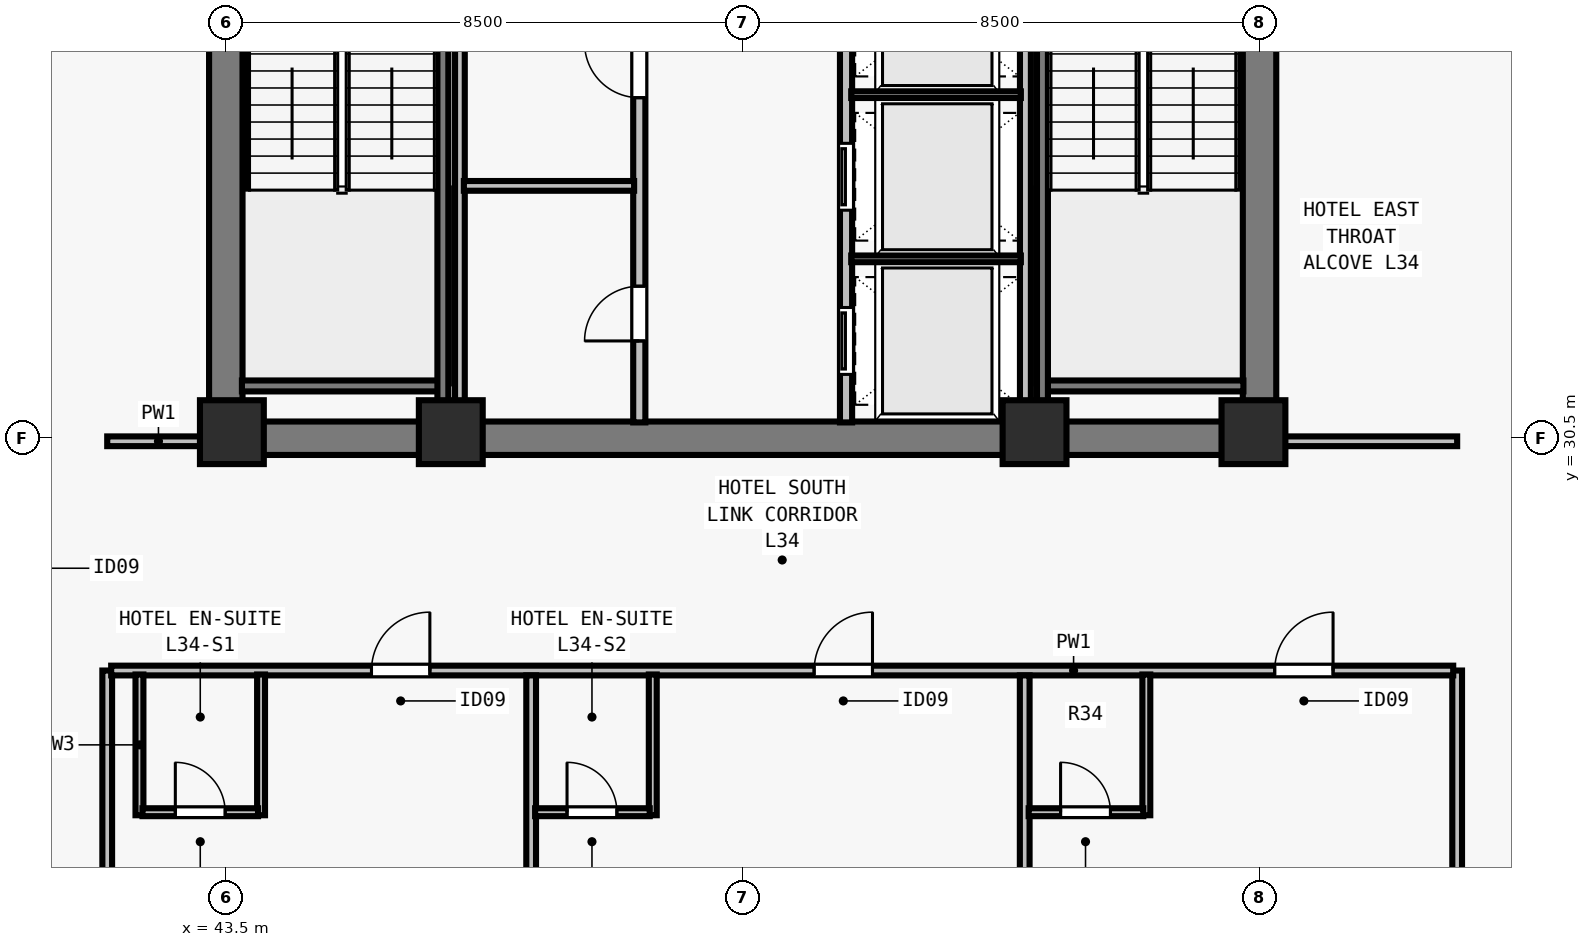
"""IFC4 building model, lengths in metres.
Left out: names, types, materials, properties, quantities, classifications, styles, units other than length and angle.
Written with IfcOpenShell. Run it as: python <this file> out.ifc"""

import sys

from ifc_helpers import new_model, si_unit, direction, frame, frame_2d, origin, origin_2d, place, context, subcontext, project, spatial, rectangle, extrude, element, fill, save


model = new_model("IFC4")
c1 = context("Model", 3, precision=1e-05, world=origin(), true_north=direction((0.0, 1.0)))
c2 = subcontext(c1, "Body", "Model", "MODEL_VIEW")
j1 = project(units=[si_unit("LENGTHUNIT", "METRE"), si_unit("PLANEANGLEUNIT", "RADIAN")], contexts=[c1])
p1 = place(None, origin())
s1 = spatial("IfcSite", under=j1, at=p1, CompositionType="ELEMENT")
p2 = place(p1, origin())
s2 = spatial("IfcBuilding", under=s1, at=p2, CompositionType="ELEMENT")
p3 = place(p2, frame((0.0, 0.0, 127.0)))
s3 = spatial("IfcBuildingStorey", under=s2, at=p3, CompositionType="ELEMENT", Elevation=127.0)
for number, where, z_axis, x_axis in (
    (1, (43.6, 30.6, 0.0), (0.0, 0.0, 1.0), (1.0, 0.0, 0.0)),
    (2, (47.2, 30.6, 0.0), (0.0, 0.0, 1.0), (1.0, 0.0, 0.0)),
    (3, (56.8, 30.6, 0.0), (0.0, 0.0, 1.0), (1.0, 0.0, 0.0)),
    (4, (60.4, 30.6, 0.0), (0.0, 0.0, 1.0), (1.0, 0.0, 0.0)),
):
    element("IfcColumn", number, at=place(p3, frame(where, z_axis=z_axis, x_axis=x_axis)), inside=s3, PredefinedType="COLUMN", context=c2, shape_type="SweptSolid", body=[
        extrude(rectangle(XDim=1.05, YDim=1.05, at=origin_2d()), origin(), (0.0, 0.0, 1.0), 3.5),
    ])
p4 = place(p3, frame((43.225, 30.5, 0.0), z_axis=(0.0, 0.0, 1.0), x_axis=(1.0, 0.0, 0.0)))
e5 = element("IfcWall", 5, at=p4, inside=s3, PredefinedType="SHEAR", context=c2, shape_type="SweptSolid", body=[
    extrude(rectangle(XDim=17.55, YDim=0.55, at=frame_2d((8.775, 0.0))), origin(), (0.0, 0.0, 1.0), 3.28),
])
for number, where, z_axis, x_axis in (
    (6, (43.5, 30.765, 0.0), (0.0, 0.0, 1.0), (0.0, 1.0, 0.0)),
    (7, (60.5, 30.765, 0.0), (0.0, 0.0, 1.0), (0.0, 1.0, 0.0)),
):
    element("IfcWall", number, at=place(p3, frame(where, z_axis=z_axis, x_axis=x_axis)), inside=s3, PredefinedType="SHEAR", context=c2, shape_type="SweptSolid", body=[
        extrude(rectangle(XDim=7.985, YDim=0.55, at=frame_2d((3.993, 0.0))), origin(), (0.0, 0.0, 1.0), 3.28),
    ])
p5 = place(p3, frame((50.3, 30.76, 0.0), z_axis=(0.0, 0.0, 1.0), x_axis=(0.0, 1.0, 0.0)))
e8 = element("IfcWall", 8, at=p5, inside=s3, PredefinedType="SOLIDWALL", context=c2, shape_type="SweptSolid", body=[
    extrude(rectangle(XDim=7.855, YDim=0.2, at=frame_2d((3.927, 0.0))), origin(), (0.0, 0.0, 1.0), 3.28),
])
p6 = place(p5, frame((1.34, 0.0, 0.0)))
e9 = element("IfcOpeningElement", 9, at=p6, cuts=e8, PredefinedType="OPENING", context=c2, shape_type="SweptSolid", body=[
    extrude(rectangle(XDim=0.9, YDim=2.12, at=frame_2d((0.45, 1.06))), frame((0.0, 0.11, 0.0), z_axis=(0.0, -1.0, 0.0), x_axis=(1.0, 0.0, 0.0)), (0.0, 0.0, 1.0), 0.22),
])
p7 = place(p5, frame((5.34, 0.0, 0.0)))
e10 = element("IfcOpeningElement", 10, at=p7, cuts=e8, PredefinedType="OPENING", context=c2, shape_type="SweptSolid", body=[
    extrude(rectangle(XDim=0.9, YDim=2.12, at=frame_2d((0.45, 1.06))), frame((0.0, 0.11, 0.0), z_axis=(0.0, -1.0, 0.0), x_axis=(1.0, 0.0, 0.0)), (0.0, 0.0, 1.0), 0.22),
])
p8 = place(p3, frame((53.7, 30.76, 0.0), z_axis=(0.0, 0.0, 1.0), x_axis=(0.0, 1.0, 0.0)))
e11 = element("IfcWall", 11, at=p8, inside=s3, PredefinedType="SOLIDWALL", context=c2, shape_type="SweptSolid", body=[
    extrude(rectangle(XDim=7.855, YDim=0.2, at=frame_2d((3.927, 0.0))), origin(), (0.0, 0.0, 1.0), 3.28),
])
p9 = place(p8, frame((0.79, 0.0, 0.0)))
e12 = element("IfcOpeningElement", 12, at=p9, cuts=e11, PredefinedType="OPENING", context=c2, shape_type="SweptSolid", body=[
    extrude(rectangle(XDim=1.1, YDim=2.2, at=frame_2d((0.55, 1.1))), frame((0.0, 0.11, 0.0), z_axis=(0.0, -1.0, 0.0), x_axis=(1.0, 0.0, 0.0)), (0.0, 0.0, 1.0), 0.22),
])
p10 = place(p8, frame((3.49, 0.0, 0.0)))
e13 = element("IfcOpeningElement", 13, at=p10, cuts=e11, PredefinedType="OPENING", context=c2, shape_type="SweptSolid", body=[
    extrude(rectangle(XDim=1.1, YDim=2.2, at=frame_2d((0.55, 1.1))), frame((0.0, 0.11, 0.0), z_axis=(0.0, -1.0, 0.0), x_axis=(1.0, 0.0, 0.0)), (0.0, 0.0, 1.0), 0.22),
])
p11 = place(p8, frame((6.19, 0.0, 0.0)))
e14 = element("IfcOpeningElement", 14, at=p11, cuts=e11, PredefinedType="OPENING", context=c2, shape_type="SweptSolid", body=[
    extrude(rectangle(XDim=1.1, YDim=2.2, at=frame_2d((0.55, 1.1))), frame((0.0, 0.11, 0.0), z_axis=(0.0, -1.0, 0.0), x_axis=(1.0, 0.0, 0.0)), (0.0, 0.0, 1.0), 0.22),
])
p12 = place(p3, frame((47.35, 30.76, 0.0), z_axis=(0.0, 0.0, 1.0), x_axis=(0.0, 1.0, 0.0)))
e15 = element("IfcWall", 15, at=p12, inside=s3, PredefinedType="PARTITIONING", context=c2, shape_type="SweptSolid", body=[
    extrude(rectangle(XDim=7.855, YDim=0.16, at=frame_2d((3.927, 0.0))), origin(), (0.0, 0.0, 1.0), 3.28),
])
p13 = place(p3, frame((47.415, 34.65, 0.0), z_axis=(0.0, 0.0, 1.0), x_axis=(1.0, 0.0, 0.0)))
e16 = element("IfcWall", 16, at=p13, inside=s3, PredefinedType="PARTITIONING", context=c2, shape_type="SweptSolid", body=[
    extrude(rectangle(XDim=2.8, YDim=0.16, at=frame_2d((1.4, 0.0))), origin(), (0.0, 0.0, 1.0), 3.28),
])
p14 = place(p3, frame((56.65, 30.76, 0.0), z_axis=(0.0, 0.0, 1.0), x_axis=(0.0, 1.0, 0.0)))
e17 = element("IfcWall", 17, at=p14, inside=s3, PredefinedType="SOLIDWALL", context=c2, shape_type="SweptSolid", body=[
    extrude(rectangle(XDim=7.855, YDim=0.18, at=frame_2d((3.927, 0.0))), origin(), (0.0, 0.0, 1.0), 3.28),
])
for number, where, z_axis, x_axis in (
    (18, (53.785, 33.45, 0.0), (0.0, 0.0, 1.0), (1.0, 0.0, 0.0)),
    (19, (53.785, 36.15, 0.0), (0.0, 0.0, 1.0), (1.0, 0.0, 0.0)),
):
    element("IfcWall", number, at=place(p3, frame(where, z_axis=z_axis, x_axis=x_axis)), inside=s3, PredefinedType="PARTITIONING", context=c2, shape_type="SweptSolid", body=[
        extrude(rectangle(XDim=2.79, YDim=0.11, at=frame_2d((1.395, 0.0))), origin(), (0.0, 0.0, 1.0), 3.28),
    ])
p15 = place(p3, frame((41.55, 15.325, 0.0), z_axis=(0.0, 0.0, 1.0), x_axis=(0.0, 1.0, 0.0)))
e20 = element("IfcWall", 20, at=p15, inside=s3, PredefinedType="PARTITIONING", context=c2, shape_type="SweptSolid", body=[
    extrude(rectangle(XDim=11.355, YDim=0.16, at=frame_2d((5.677, 0.0))), origin(), (0.0, 0.0, 1.0), 3.28),
])
p16 = place(p3, frame((41.55, 30.45, 0.0), z_axis=(0.0, 0.0, 1.0), x_axis=(1.0, 0.0, 0.0)))
e21 = element("IfcWall", 21, at=p16, inside=s3, PredefinedType="PARTITIONING", context=c2, shape_type="SweptSolid", body=[
    extrude(rectangle(XDim=1.685, YDim=0.16, at=frame_2d((0.843, 0.0))), origin(), (0.0, 0.0, 1.0), 3.28),
])
p17 = place(p3, frame((63.75, 15.325, 0.0), z_axis=(0.0, 0.0, 1.0), x_axis=(0.0, 1.0, 0.0)))
e22 = element("IfcWall", 22, at=p17, inside=s3, PredefinedType="PARTITIONING", context=c2, shape_type="SweptSolid", body=[
    extrude(rectangle(XDim=11.355, YDim=0.16, at=frame_2d((5.677, 0.0))), origin(), (0.0, 0.0, 1.0), 2.555),
])
p18 = place(p3, frame((60.765, 30.45, 0.0), z_axis=(0.0, 0.0, 1.0), x_axis=(1.0, 0.0, 0.0)))
e23 = element("IfcWall", 23, at=p18, inside=s3, PredefinedType="PARTITIONING", context=c2, shape_type="SweptSolid", body=[
    extrude(rectangle(XDim=2.985, YDim=0.16, at=frame_2d((1.493, 0.0))), origin(), (0.0, 0.0, 1.0), 3.28),
])
p19 = place(p3, frame((41.615, 26.68, 0.0), z_axis=(0.0, 0.0, 1.0), x_axis=(1.0, 0.0, 0.0)))
e24 = element("IfcWall", 24, at=p19, inside=s3, PredefinedType="PARTITIONING", context=c2, shape_type="SweptSolid", body=[
    extrude(rectangle(XDim=22.07, YDim=0.16, at=frame_2d((11.035, 0.0))), origin(), (0.0, 0.0, 1.0), 3.28),
])
p20 = place(p19, frame((4.281, 0.0, 0.0)))
e25 = element("IfcOpeningElement", 25, at=p20, cuts=e24, PredefinedType="OPENING", context=c2, shape_type="SweptSolid", body=[
    extrude(rectangle(XDim=0.96, YDim=2.15, at=frame_2d((0.48, 1.075))), frame((0.0, 0.09, 0.0), z_axis=(0.0, -1.0, 0.0), x_axis=(1.0, 0.0, 0.0)), (0.0, 0.0, 1.0), 0.18),
])
p21 = place(p19, frame((11.56, 0.0, 0.0)))
e26 = element("IfcOpeningElement", 26, at=p21, cuts=e24, PredefinedType="OPENING", context=c2, shape_type="SweptSolid", body=[
    extrude(rectangle(XDim=0.96, YDim=2.15, at=frame_2d((0.48, 1.075))), frame((0.0, 0.09, 0.0), z_axis=(0.0, -1.0, 0.0), x_axis=(1.0, 0.0, 0.0)), (0.0, 0.0, 1.0), 0.18),
])
p22 = place(p19, frame((19.134, 0.0, 0.0)))
e27 = element("IfcOpeningElement", 27, at=p22, cuts=e24, PredefinedType="OPENING", context=c2, shape_type="SweptSolid", body=[
    extrude(rectangle(XDim=0.96, YDim=2.15, at=frame_2d((0.48, 1.075))), frame((0.0, 0.09, 0.0), z_axis=(0.0, -1.0, 0.0), x_axis=(1.0, 0.0, 0.0)), (0.0, 0.0, 1.0), 0.18),
])
for number, where, z_axis, x_axis in (
    (28, (42.08, 24.3, 0.0), (0.0, 0.0, 1.0), (0.0, 1.0, 0.0)),
    (29, (44.08, 24.3, 0.0), (0.0, 0.0, 1.0), (0.0, 1.0, 0.0)),
):
    element("IfcWall", number, at=place(p3, frame(where, z_axis=z_axis, x_axis=x_axis)), inside=s3, PredefinedType="PLUMBINGWALL", context=c2, shape_type="SweptSolid", body=[
        extrude(rectangle(XDim=2.315, YDim=0.13, at=frame_2d((1.157, 0.0))), origin(), (0.0, 0.0, 1.0), 3.28),
    ])
p23 = place(p3, frame((42.13, 24.35, 0.0), z_axis=(0.0, 0.0, 1.0), x_axis=(1.0, 0.0, 0.0)))
e30 = element("IfcWall", 30, at=p23, inside=s3, PredefinedType="PLUMBINGWALL", context=c2, shape_type="SweptSolid", body=[
    extrude(rectangle(XDim=1.9, YDim=0.13, at=frame_2d((0.95, 0.0))), origin(), (0.0, 0.0, 1.0), 3.28),
])
p24 = place(p23, frame((0.54, 0.0, 0.0)))
e31 = element("IfcOpeningElement", 31, at=p24, cuts=e30, PredefinedType="OPENING", context=c2, shape_type="SweptSolid", body=[
    extrude(rectangle(XDim=0.82, YDim=2.1, at=frame_2d((0.41, 1.05))), frame((0.0, 0.075, 0.0), z_axis=(0.0, -1.0, 0.0), x_axis=(1.0, 0.0, 0.0)), (0.0, 0.0, 1.0), 0.15),
])
p25 = place(p3, frame((48.522, 15.325, 0.0), z_axis=(0.0, 0.0, 1.0), x_axis=(0.0, 1.0, 0.0)))
e32 = element("IfcWall", 32, at=p25, inside=s3, PredefinedType="PARTITIONING", context=c2, shape_type="SweptSolid", body=[
    extrude(rectangle(XDim=11.275, YDim=0.16, at=frame_2d((5.638, 0.0))), origin(), (0.0, 0.0, 1.0), 2.896),
])
p26 = place(p3, frame((50.522, 24.3, 0.0), z_axis=(0.0, 0.0, 1.0), x_axis=(0.0, 1.0, 0.0)))
e33 = element("IfcWall", 33, at=p26, inside=s3, PredefinedType="PLUMBINGWALL", context=c2, shape_type="SweptSolid", body=[
    extrude(rectangle(XDim=2.315, YDim=0.13, at=frame_2d((1.157, 0.0))), origin(), (0.0, 0.0, 1.0), 3.28),
])
p27 = place(p3, frame((48.587, 24.35, 0.0), z_axis=(0.0, 0.0, 1.0), x_axis=(1.0, 0.0, 0.0)))
e34 = element("IfcWall", 34, at=p27, inside=s3, PredefinedType="PLUMBINGWALL", context=c2, shape_type="SweptSolid", body=[
    extrude(rectangle(XDim=1.885, YDim=0.13, at=frame_2d((0.942, 0.0))), origin(), (0.0, 0.0, 1.0), 3.28),
])
p28 = place(p27, frame((0.525, 0.0, 0.0)))
e35 = element("IfcOpeningElement", 35, at=p28, cuts=e34, PredefinedType="OPENING", context=c2, shape_type="SweptSolid", body=[
    extrude(rectangle(XDim=0.82, YDim=2.1, at=frame_2d((0.41, 1.05))), frame((0.0, 0.075, 0.0), z_axis=(0.0, -1.0, 0.0), x_axis=(1.0, 0.0, 0.0)), (0.0, 0.0, 1.0), 0.15),
])
p29 = place(p3, frame((56.638, 15.325, 0.0), z_axis=(0.0, 0.0, 1.0), x_axis=(0.0, 1.0, 0.0)))
e36 = element("IfcWall", 36, at=p29, inside=s3, PredefinedType="PARTITIONING", context=c2, shape_type="SweptSolid", body=[
    extrude(rectangle(XDim=11.275, YDim=0.16, at=frame_2d((5.638, 0.0))), origin(), (0.0, 0.0, 1.0), 2.555),
])
p30 = place(p3, frame((58.638, 24.3, 0.0), z_axis=(0.0, 0.0, 1.0), x_axis=(0.0, 1.0, 0.0)))
e37 = element("IfcWall", 37, at=p30, inside=s3, PredefinedType="PLUMBINGWALL", context=c2, shape_type="SweptSolid", body=[
    extrude(rectangle(XDim=2.315, YDim=0.13, at=frame_2d((1.157, 0.0))), origin(), (0.0, 0.0, 1.0), 3.28),
])
p31 = place(p3, frame((56.703, 24.35, 0.0), z_axis=(0.0, 0.0, 1.0), x_axis=(1.0, 0.0, 0.0)))
e38 = element("IfcWall", 38, at=p31, inside=s3, PredefinedType="PLUMBINGWALL", context=c2, shape_type="SweptSolid", body=[
    extrude(rectangle(XDim=1.885, YDim=0.13, at=frame_2d((0.942, 0.0))), origin(), (0.0, 0.0, 1.0), 3.28),
])
p32 = place(p31, frame((0.525, 0.0, 0.0)))
e39 = element("IfcOpeningElement", 39, at=p32, cuts=e38, PredefinedType="OPENING", context=c2, shape_type="SweptSolid", body=[
    extrude(rectangle(XDim=0.82, YDim=2.1, at=frame_2d((0.41, 1.05))), frame((0.0, 0.075, 0.0), z_axis=(0.0, -1.0, 0.0), x_axis=(1.0, 0.0, 0.0)), (0.0, 0.0, 1.0), 0.15),
])
p33 = place(p3, frame((43.765, 31.36, 0.0), z_axis=(0.0, 0.0, 1.0), x_axis=(1.0, 0.0, 0.0)))
e40 = element("IfcWall", 40, at=p33, inside=s3, PredefinedType="SOLIDWALL", context=c2, shape_type="SweptSolid", body=[
    extrude(rectangle(XDim=3.23, YDim=0.18, at=frame_2d((1.615, 0.0))), origin(), (0.0, 0.0, 1.0), 3.28),
])
p34 = place(p3, frame((47.07, 38.78, 0.0), z_axis=(0.0, 0.0, 1.0), x_axis=(0.0, -1.0, 0.0)))
e41 = element("IfcWall", 41, at=p34, inside=s3, PredefinedType="SOLIDWALL", context=c2, shape_type="SweptSolid", body=[
    extrude(rectangle(XDim=8.017, YDim=0.18, at=frame_2d((4.009, 0.0))), origin(), (0.0, 0.0, 1.0), 3.28),
])
p35 = place(p3, frame((57.005, 31.36, 0.0), z_axis=(0.0, 0.0, 1.0), x_axis=(1.0, 0.0, 0.0)))
e42 = element("IfcWall", 42, at=p35, inside=s3, PredefinedType="SOLIDWALL", context=c2, shape_type="SweptSolid", body=[
    extrude(rectangle(XDim=3.23, YDim=0.18, at=frame_2d((1.615, 0.0))), origin(), (0.0, 0.0, 1.0), 3.28),
])
p36 = place(p3, frame((56.93, 38.78, 0.0), z_axis=(0.0, 0.0, 1.0), x_axis=(0.0, -1.0, 0.0)))
e43 = element("IfcWall", 43, at=p36, inside=s3, PredefinedType="SOLIDWALL", context=c2, shape_type="SweptSolid", body=[
    extrude(rectangle(XDim=8.017, YDim=0.18, at=frame_2d((4.009, 0.0))), origin(), (0.0, 0.0, 1.0), 3.28),
])
p37 = place(p6, origin())
e44 = element("IfcDoor", 44, at=p37, inside=s3, OperationType="SINGLE_SWING_LEFT", PredefinedType="DOOR", context=c2, shape_type="SweptSolid", body=[
    extrude(rectangle(XDim=0.9, YDim=2.12, at=frame_2d((0.45, 1.06))), frame((0.0, 0.025, 0.0), z_axis=(0.0, -1.0, 0.0), x_axis=(1.0, 0.0, 0.0)), (0.0, 0.0, 1.0), 0.05),
])
fill(e9, e44)
p38 = place(p7, origin())
e45 = element("IfcDoor", 45, at=p38, inside=s3, OperationType="SINGLE_SWING_RIGHT", PredefinedType="DOOR", context=c2, shape_type="SweptSolid", body=[
    extrude(rectangle(XDim=0.9, YDim=2.12, at=frame_2d((0.45, 1.06))), frame((0.0, 0.025, 0.0), z_axis=(0.0, -1.0, 0.0), x_axis=(1.0, 0.0, 0.0)), (0.0, 0.0, 1.0), 0.05),
])
fill(e10, e45)
p39 = place(p9, origin())
e46 = element("IfcDoor", 46, at=p39, inside=s3, OperationType="SLIDING_TO_LEFT", PredefinedType="DOOR", context=c2, shape_type="SweptSolid", body=[
    extrude(rectangle(XDim=1.1, YDim=2.2, at=frame_2d((0.55, 1.1))), frame((0.0, 0.025, 0.0), z_axis=(0.0, -1.0, 0.0), x_axis=(1.0, 0.0, 0.0)), (0.0, 0.0, 1.0), 0.05),
])
fill(e12, e46)
p40 = place(p10, origin())
e47 = element("IfcDoor", 47, at=p40, inside=s3, OperationType="SLIDING_TO_LEFT", PredefinedType="DOOR", context=c2, shape_type="SweptSolid", body=[
    extrude(rectangle(XDim=1.1, YDim=2.2, at=frame_2d((0.55, 1.1))), frame((0.0, 0.025, 0.0), z_axis=(0.0, -1.0, 0.0), x_axis=(1.0, 0.0, 0.0)), (0.0, 0.0, 1.0), 0.05),
])
fill(e13, e47)
p41 = place(p24, origin())
e48 = element("IfcDoor", 48, at=p41, inside=s3, OperationType="SINGLE_SWING_LEFT", PredefinedType="DOOR", context=c2, shape_type="SweptSolid", body=[
    extrude(rectangle(XDim=0.82, YDim=2.1, at=frame_2d((0.41, 1.05))), frame((0.0, 0.025, 0.0), z_axis=(0.0, -1.0, 0.0), x_axis=(1.0, 0.0, 0.0)), (0.0, 0.0, 1.0), 0.05),
])
fill(e31, e48)
p42 = place(p20, origin())
e49 = element("IfcDoor", 49, at=p42, inside=s3, OperationType="SINGLE_SWING_RIGHT", PredefinedType="DOOR", context=c2, shape_type="SweptSolid", body=[
    extrude(rectangle(XDim=0.96, YDim=2.15, at=frame_2d((0.48, 1.075))), frame((0.0, 0.025, 0.0), z_axis=(0.0, -1.0, 0.0), x_axis=(1.0, 0.0, 0.0)), (0.0, 0.0, 1.0), 0.05),
])
fill(e25, e49)
p43 = place(p28, origin())
e50 = element("IfcDoor", 50, at=p43, inside=s3, OperationType="SINGLE_SWING_LEFT", PredefinedType="DOOR", context=c2, shape_type="SweptSolid", body=[
    extrude(rectangle(XDim=0.82, YDim=2.1, at=frame_2d((0.41, 1.05))), frame((0.0, 0.025, 0.0), z_axis=(0.0, -1.0, 0.0), x_axis=(1.0, 0.0, 0.0)), (0.0, 0.0, 1.0), 0.05),
])
fill(e35, e50)
p44 = place(p21, origin())
e51 = element("IfcDoor", 51, at=p44, inside=s3, OperationType="SINGLE_SWING_RIGHT", PredefinedType="DOOR", context=c2, shape_type="SweptSolid", body=[
    extrude(rectangle(XDim=0.96, YDim=2.15, at=frame_2d((0.48, 1.075))), frame((0.0, 0.025, 0.0), z_axis=(0.0, -1.0, 0.0), x_axis=(1.0, 0.0, 0.0)), (0.0, 0.0, 1.0), 0.05),
])
fill(e26, e51)
p45 = place(p32, origin())
e52 = element("IfcDoor", 52, at=p45, inside=s3, OperationType="SINGLE_SWING_LEFT", PredefinedType="DOOR", context=c2, shape_type="SweptSolid", body=[
    extrude(rectangle(XDim=0.82, YDim=2.1, at=frame_2d((0.41, 1.05))), frame((0.0, 0.025, 0.0), z_axis=(0.0, -1.0, 0.0), x_axis=(1.0, 0.0, 0.0)), (0.0, 0.0, 1.0), 0.05),
])
fill(e39, e52)
p46 = place(p22, origin())
e53 = element("IfcDoor", 53, at=p46, inside=s3, OperationType="SINGLE_SWING_RIGHT", PredefinedType="DOOR", context=c2, shape_type="SweptSolid", body=[
    extrude(rectangle(XDim=0.96, YDim=2.15, at=frame_2d((0.48, 1.075))), frame((0.0, 0.025, 0.0), z_axis=(0.0, -1.0, 0.0), x_axis=(1.0, 0.0, 0.0)), (0.0, 0.0, 1.0), 0.05),
])
fill(e27, e53)
save(model, sys.argv[1])
